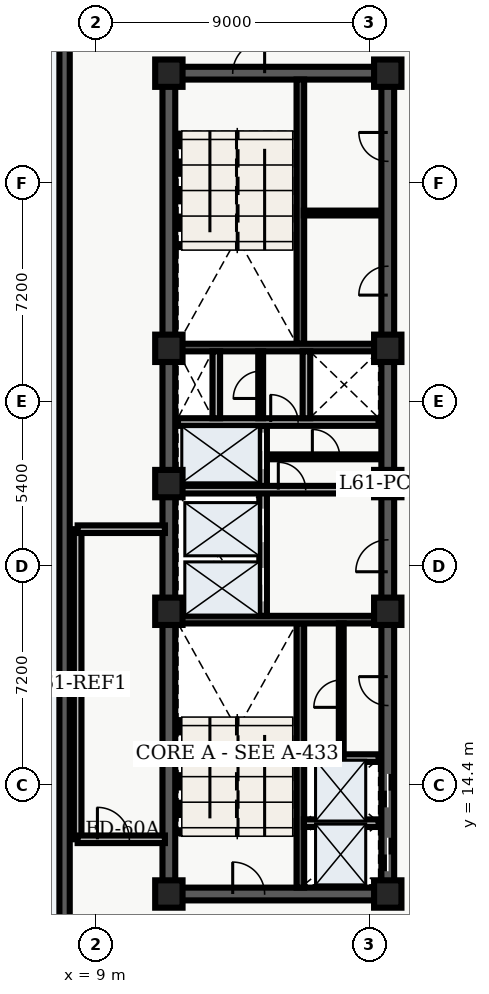
"""IFC4 building model, lengths in metres.
Left out: names, types, materials, properties, quantities, classifications, styles, units other than length and angle.
Written with IfcOpenShell. Run it as: python <this file> out.ifc"""

import sys

from ifc_helpers import new_model, entity, si_unit, converted_unit, direction, frame, origin_with_axes, origin_2d_with_axis, place, context, subcontext, project, spatial, polyline, rectangle, outline, extrude, element, fill, save


model = new_model("IFC4")
c1 = context("Model", 3, precision=1e-05, world=origin_with_axes(), true_north=direction((0.0, 1.0)))
c2 = subcontext(c1, "Body", "Model", "MODEL_VIEW")
j1 = project(units=[si_unit("LENGTHUNIT", "METRE"), converted_unit("PLANEANGLEUNIT", "DEGREE", entity("IfcPlaneAngleMeasure", 0.017), si_unit("PLANEANGLEUNIT", "RADIAN"), dimensions=[0, 0, 0, 0, 0, 0, 0])], contexts=[c1])
p1 = place(None, origin_with_axes())
s1 = spatial("IfcSite", under=j1, at=p1, CompositionType="ELEMENT")
p2 = place(p1, origin_with_axes())
s2 = spatial("IfcBuilding", under=s1, at=p2, CompositionType="ELEMENT")
p3 = place(p2, frame((0.0, 0.0, 248.1), z_axis=(0.0, 0.0, 1.0), x_axis=(1.0, 0.0, 0.0)))
s3 = spatial("IfcBuildingStorey", under=s2, at=p3, CompositionType="ELEMENT", Elevation=248.1)
p4 = place(p3, frame((11.4, 10.8, 0.0), z_axis=(0.0, 0.0, 1.0), x_axis=(0.0, 1.0, 0.0)))
e1 = element("IfcWall", 1, at=p4, inside=s3, PredefinedType="SHEAR", context=c2, shape_type="SweptSolid", body=[
    extrude(outline(polyline([(0.0, -0.21), (27.0, -0.21), (27.0, 0.21), (0.0, 0.21), (0.0, -0.21)])), origin_with_axes(), (0.0, 0.0, 1.0), 4.56),
])
p5 = place(p3, frame((11.4, 10.8, 0.0), z_axis=(0.0, 0.0, 1.0), x_axis=(1.0, 0.0, 0.0)))
e2 = element("IfcWall", 2, at=p5, inside=s3, PredefinedType="SHEAR", context=c2, shape_type="SweptSolid", body=[
    extrude(outline(polyline([(0.0, -0.21), (7.2, -0.21), (7.2, 0.21), (0.0, 0.21), (0.0, -0.21)])), origin_with_axes(), (0.0, 0.0, 1.0), 4.56),
])
p6 = place(p5, frame((2.625, 0.0, 0.0), z_axis=(0.0, 0.0, 1.0), x_axis=(1.0, 0.0, 0.0)))
e3 = element("IfcOpeningElement", 3, at=p6, cuts=e2, PredefinedType="OPENING", context=c2, shape_type="SweptSolid", body=[
    extrude(rectangle(XDim=1.05, YDim=0.44, at=origin_2d_with_axis()), origin_with_axes(), (0.0, 0.0, 1.0), 2.15),
])
p7 = place(p3, frame((11.4, 37.8, 0.0), z_axis=(0.0, 0.0, 1.0), x_axis=(1.0, 0.0, 0.0)))
e4 = element("IfcWall", 4, at=p7, inside=s3, PredefinedType="SHEAR", context=c2, shape_type="SweptSolid", body=[
    extrude(outline(polyline([(0.0, -0.21), (7.2, -0.21), (7.2, 0.21), (0.0, 0.21), (0.0, -0.21)])), origin_with_axes(), (0.0, 0.0, 1.0), 4.56),
])
p8 = place(p7, frame((2.625, 0.0, 0.0), z_axis=(0.0, 0.0, 1.0), x_axis=(1.0, 0.0, 0.0)))
e5 = element("IfcOpeningElement", 5, at=p8, cuts=e4, PredefinedType="OPENING", context=c2, shape_type="SweptSolid", body=[
    extrude(rectangle(XDim=1.05, YDim=0.44, at=origin_2d_with_axis()), origin_with_axes(), (0.0, 0.0, 1.0), 2.15),
])
p9 = place(p3, frame((18.6, 10.8, 0.0), z_axis=(0.0, 0.0, 1.0), x_axis=(0.0, 1.0, 0.0)))
e6 = element("IfcWall", 6, at=p9, inside=s3, PredefinedType="SHEAR", context=c2, shape_type="SweptSolid", body=[
    extrude(outline(polyline([(0.0, -0.21), (13.5, -0.21), (13.5, 0.21), (0.0, 0.21), (0.0, -0.21)])), origin_with_axes(), (0.0, 0.0, 1.0), 4.56),
])
p10 = place(p9, frame((1.3, 0.0, 0.0), z_axis=(0.0, 0.0, 1.0), x_axis=(1.0, 0.0, 0.0)))
e7 = element("IfcOpeningElement", 7, at=p10, cuts=e6, PredefinedType="OPENING", context=c2, shape_type="SweptSolid", body=[
    extrude(rectangle(XDim=1.1, YDim=0.44, at=origin_2d_with_axis()), origin_with_axes(), (0.0, 0.0, 1.0), 2.15),
])
p11 = place(p9, frame((3.4, 0.0, 0.0), z_axis=(0.0, 0.0, 1.0), x_axis=(1.0, 0.0, 0.0)))
e8 = element("IfcOpeningElement", 8, at=p11, cuts=e6, PredefinedType="OPENING", context=c2, shape_type="SweptSolid", body=[
    extrude(rectangle(XDim=1.1, YDim=0.44, at=origin_2d_with_axis()), origin_with_axes(), (0.0, 0.0, 1.0), 2.15),
])
p12 = place(p9, frame((11.125, 0.0, 0.0), z_axis=(0.0, 0.0, 1.0), x_axis=(1.0, 0.0, 0.0)))
e9 = element("IfcOpeningElement", 9, at=p12, cuts=e6, PredefinedType="OPENING", context=c2, shape_type="SweptSolid", body=[
    extrude(rectangle(XDim=1.05, YDim=0.44, at=origin_2d_with_axis()), origin_with_axes(), (0.0, 0.0, 1.0), 2.15),
])
p13 = place(p9, frame((6.675, 0.0, 0.0), z_axis=(0.0, 0.0, 1.0), x_axis=(1.0, 0.0, 0.0)))
e10 = element("IfcOpeningElement", 10, at=p13, cuts=e6, PredefinedType="OPENING", context=c2, shape_type="SweptSolid", body=[
    extrude(rectangle(XDim=0.95, YDim=0.44, at=origin_2d_with_axis()), origin_with_axes(), (0.0, 0.0, 1.0), 2.15),
])
p14 = place(p3, frame((18.6, 24.3, 0.0), z_axis=(0.0, 0.0, 1.0), x_axis=(0.0, 1.0, 0.0)))
e11 = element("IfcWall", 11, at=p14, inside=s3, PredefinedType="SHEAR", context=c2, shape_type="SweptSolid", body=[
    extrude(outline(polyline([(0.0, -0.21), (13.5, -0.21), (13.5, 0.21), (0.0, 0.21), (0.0, -0.21)])), origin_with_axes(), (0.0, 0.0, 1.0), 4.56),
])
p15 = place(p14, frame((6.675, 0.0, 0.0), z_axis=(0.0, 0.0, 1.0), x_axis=(1.0, 0.0, 0.0)))
e12 = element("IfcOpeningElement", 12, at=p15, cuts=e11, PredefinedType="OPENING", context=c2, shape_type="SweptSolid", body=[
    extrude(rectangle(XDim=0.95, YDim=0.44, at=origin_2d_with_axis()), origin_with_axes(), (0.0, 0.0, 1.0), 2.15),
])
p16 = place(p14, frame((11.075, 0.0, 0.0), z_axis=(0.0, 0.0, 1.0), x_axis=(1.0, 0.0, 0.0)))
e13 = element("IfcOpeningElement", 13, at=p16, cuts=e11, PredefinedType="OPENING", context=c2, shape_type="SweptSolid", body=[
    extrude(rectangle(XDim=0.95, YDim=0.44, at=origin_2d_with_axis()), origin_with_axes(), (0.0, 0.0, 1.0), 2.15),
])
p17 = place(p3, frame((15.725, 11.01, 0.0), z_axis=(0.0, 0.0, 1.0), x_axis=(0.0, 1.0, 0.0)))
e14 = element("IfcWall", 14, at=p17, inside=s3, PredefinedType="SHEAR", context=c2, shape_type="SweptSolid", body=[
    extrude(outline(polyline([(0.0, -0.125), (8.69, -0.125), (8.69, 0.125), (0.0, 0.125), (0.0, -0.125)])), origin_with_axes(), (0.0, 0.0, 1.0), 4.56),
])
p18 = place(p3, frame((11.61, 19.825, 0.0), z_axis=(0.0, 0.0, 1.0), x_axis=(1.0, 0.0, 0.0)))
e15 = element("IfcWall", 15, at=p18, inside=s3, PredefinedType="SHEAR", context=c2, shape_type="SweptSolid", body=[
    extrude(outline(polyline([(0.0, -0.125), (6.78, -0.125), (6.78, 0.125), (0.0, 0.125), (0.0, -0.125)])), origin_with_axes(), (0.0, 0.0, 1.0), 4.56),
])
p19 = place(p3, frame((15.725, 28.9, 0.0), z_axis=(0.0, 0.0, 1.0), x_axis=(0.0, 1.0, 0.0)))
e16 = element("IfcWall", 16, at=p19, inside=s3, PredefinedType="SHEAR", context=c2, shape_type="SweptSolid", body=[
    extrude(outline(polyline([(0.0, -0.125), (8.69, -0.125), (8.69, 0.125), (0.0, 0.125), (0.0, -0.125)])), origin_with_axes(), (0.0, 0.0, 1.0), 4.56),
])
p20 = place(p3, frame((11.61, 28.775, 0.0), z_axis=(0.0, 0.0, 1.0), x_axis=(1.0, 0.0, 0.0)))
e17 = element("IfcWall", 17, at=p20, inside=s3, PredefinedType="SHEAR", context=c2, shape_type="SweptSolid", body=[
    extrude(outline(polyline([(0.0, -0.125), (6.78, -0.125), (6.78, 0.125), (0.0, 0.125), (0.0, -0.125)])), origin_with_axes(), (0.0, 0.0, 1.0), 4.56),
])
p21 = place(p3, frame((14.5, 19.95, 0.0), z_axis=(0.0, 0.0, 1.0), x_axis=(0.0, 1.0, 0.0)))
e18 = element("IfcWall", 18, at=p21, inside=s3, PredefinedType="SOLIDWALL", context=c2, shape_type="SweptSolid", body=[
    extrude(outline(polyline([(0.0, -0.125), (6.25, -0.125), (6.25, 0.125), (0.0, 0.125), (0.0, -0.125)])), origin_with_axes(), (0.0, 0.0, 1.0), 3.6),
])
p22 = place(p21, frame((1.025, 0.0, 0.0), z_axis=(0.0, 0.0, 1.0), x_axis=(1.0, 0.0, 0.0)))
e19 = element("IfcOpeningElement", 19, at=p22, cuts=e18, PredefinedType="OPENING", context=c2, shape_type="SweptSolid", body=[
    extrude(rectangle(XDim=1.1, YDim=0.27, at=origin_2d_with_axis()), origin_with_axes(), (0.0, 0.0, 1.0), 2.15),
])
p23 = place(p21, frame((2.975, 0.0, 0.0), z_axis=(0.0, 0.0, 1.0), x_axis=(1.0, 0.0, 0.0)))
e20 = element("IfcOpeningElement", 20, at=p23, cuts=e18, PredefinedType="OPENING", context=c2, shape_type="SweptSolid", body=[
    extrude(rectangle(XDim=1.1, YDim=0.27, at=origin_2d_with_axis()), origin_with_axes(), (0.0, 0.0, 1.0), 2.15),
])
p24 = place(p21, frame((5.425, 0.0, 0.0), z_axis=(0.0, 0.0, 1.0), x_axis=(1.0, 0.0, 0.0)))
e21 = element("IfcOpeningElement", 21, at=p24, cuts=e18, PredefinedType="OPENING", context=c2, shape_type="SweptSolid", body=[
    extrude(rectangle(XDim=1.2, YDim=0.27, at=origin_2d_with_axis()), origin_with_axes(), (0.0, 0.0, 1.0), 2.15),
])
p25 = place(p3, frame((11.7, 24.1, 0.0), z_axis=(0.0, 0.0, 1.0), x_axis=(1.0, 0.0, 0.0)))
e22 = element("IfcWall", 22, at=p25, inside=s3, PredefinedType="SOLIDWALL", context=c2, shape_type="SweptSolid", body=[
    extrude(outline(polyline([(0.0, -0.125), (6.6, -0.125), (6.6, 0.125), (0.0, 0.125), (0.0, -0.125)])), origin_with_axes(), (0.0, 0.0, 1.0), 3.6),
])
p26 = place(p25, frame((3.75, 0.0, 0.0), z_axis=(0.0, 0.0, 1.0), x_axis=(1.0, 0.0, 0.0)))
e23 = element("IfcOpeningElement", 23, at=p26, cuts=e22, PredefinedType="OPENING", context=c2, shape_type="SweptSolid", body=[
    extrude(rectangle(XDim=0.9, YDim=0.27, at=origin_2d_with_axis()), origin_with_axes(), (0.0, 0.0, 1.0), 2.15),
])
p27 = place(p3, frame((11.7, 26.325, 0.0), z_axis=(0.0, 0.0, 1.0), x_axis=(1.0, 0.0, 0.0)))
e24 = element("IfcWall", 24, at=p27, inside=s3, PredefinedType="SOLIDWALL", context=c2, shape_type="SweptSolid", body=[
    extrude(outline(polyline([(0.0, -0.125), (6.6, -0.125), (6.6, 0.125), (0.0, 0.125), (0.0, -0.125)])), origin_with_axes(), (0.0, 0.0, 1.0), 3.6),
])
p28 = place(p27, frame((3.5, 0.0, 0.0), z_axis=(0.0, 0.0, 1.0), x_axis=(1.0, 0.0, 0.0)))
e25 = element("IfcOpeningElement", 25, at=p28, cuts=e24, PredefinedType="OPENING", context=c2, shape_type="SweptSolid", body=[
    extrude(rectangle(XDim=0.9, YDim=0.27, at=origin_2d_with_axis()), origin_with_axes(), (0.0, 0.0, 1.0), 2.15),
])
for number, where, z_axis, x_axis in (
    (26, (12.96, 26.45, 0.0), (0.0, 0.0, 1.0), (0.0, 1.0, 0.0)),
    (27, (15.925, 26.45, 0.0), (0.0, 0.0, 1.0), (0.0, 1.0, 0.0)),
):
    element("IfcWall", number, at=place(p3, frame(where, z_axis=z_axis, x_axis=x_axis)), inside=s3, PredefinedType="SOLIDWALL", context=c2, shape_type="SweptSolid", body=[
        extrude(outline(polyline([(0.0, -0.125), (2.2, -0.125), (2.2, 0.125), (0.0, 0.125), (0.0, -0.125)])), origin_with_axes(), (0.0, 0.0, 1.0), 3.6),
    ])
for number, where, z_axis, x_axis in (
    (28, (11.4, 10.8, 0.0), (0.0, 0.0, 1.0), (1.0, 0.0, 0.0)),
    (29, (11.4, 20.1, 0.0), (0.0, 0.0, 1.0), (1.0, 0.0, 0.0)),
    (30, (11.4, 24.3, 0.0), (0.0, 0.0, 1.0), (1.0, 0.0, 0.0)),
    (31, (11.4, 28.75, 0.0), (0.0, 0.0, 1.0), (1.0, 0.0, 0.0)),
    (32, (11.4, 37.8, 0.0), (0.0, 0.0, 1.0), (1.0, 0.0, 0.0)),
    (33, (18.6, 10.8, 0.0), (0.0, 0.0, 1.0), (1.0, 0.0, 0.0)),
    (34, (18.6, 20.1, 0.0), (0.0, 0.0, 1.0), (1.0, 0.0, 0.0)),
    (35, (18.6, 24.3, 0.0), (0.0, 0.0, 1.0), (1.0, 0.0, 0.0)),
    (36, (18.6, 28.75, 0.0), (0.0, 0.0, 1.0), (1.0, 0.0, 0.0)),
    (37, (18.6, 37.8, 0.0), (0.0, 0.0, 1.0), (1.0, 0.0, 0.0)),
):
    element("IfcColumn", number, at=place(p3, frame(where, z_axis=z_axis, x_axis=x_axis)), inside=s3, PredefinedType="COLUMN", context=c2, shape_type="SweptSolid", body=[
        extrude(rectangle(XDim=0.9, YDim=0.9, at=origin_2d_with_axis()), origin_with_axes(), (0.0, 0.0, 1.0), 4.8),
    ])
p29 = place(p3, frame((14.62, 25.18, 0.0), z_axis=(0.0, 0.0, 1.0), x_axis=(1.0, 0.0, 0.0)))
e38 = element("IfcWall", 38, at=p29, inside=s3, PredefinedType="PARTITIONING", context=c2, shape_type="SweptSolid", body=[
    extrude(outline(polyline([(0.0, -0.08), (3.68, -0.08), (3.68, 0.08), (0.0, 0.08), (0.0, -0.08)])), origin_with_axes(), (0.0, 0.0, 1.0), 3.2),
])
p30 = place(p29, frame((1.95, 0.0, 0.0), z_axis=(0.0, 0.0, 1.0), x_axis=(1.0, 0.0, 0.0)))
e39 = element("IfcOpeningElement", 39, at=p30, cuts=e38, PredefinedType="OPENING", context=c2, shape_type="SweptSolid", body=[
    extrude(rectangle(XDim=0.9, YDim=0.18, at=origin_2d_with_axis()), origin_with_axes(), (0.0, 0.0, 1.0), 2.15),
])
p31 = place(p3, frame((14.42, 26.45, 0.0), z_axis=(0.0, 0.0, 1.0), x_axis=(0.0, 1.0, 0.0)))
e40 = element("IfcWall", 40, at=p31, inside=s3, PredefinedType="PARTITIONING", context=c2, shape_type="SweptSolid", body=[
    extrude(outline(polyline([(0.0, -0.08), (2.2, -0.08), (2.2, 0.08), (0.0, 0.08), (0.0, -0.08)])), origin_with_axes(), (0.0, 0.0, 1.0), 3.2),
])
p32 = place(p31, frame((1.1, 0.0, 0.0), z_axis=(0.0, 0.0, 1.0), x_axis=(1.0, 0.0, 0.0)))
e41 = element("IfcOpeningElement", 41, at=p32, cuts=e40, PredefinedType="OPENING", context=c2, shape_type="SweptSolid", body=[
    extrude(rectangle(XDim=0.9, YDim=0.18, at=origin_2d_with_axis()), origin_with_axes(), (0.0, 0.0, 1.0), 2.15),
])
for number, where, z_axis, x_axis in (
    (42, (15.84, 13.13, 0.0), (0.0, 0.0, 1.0), (1.0, 0.0, 0.0)),
    (43, (15.84, 15.27, 0.0), (0.0, 0.0, 1.0), (1.0, 0.0, 0.0)),
):
    element("IfcWall", number, at=place(p3, frame(where, z_axis=z_axis, x_axis=x_axis)), inside=s3, PredefinedType="SOLIDWALL", context=c2, shape_type="SweptSolid", body=[
        extrude(outline(polyline([(0.0, -0.125), (2.46, -0.125), (2.46, 0.125), (0.0, 0.125), (0.0, -0.125)])), origin_with_axes(), (0.0, 0.0, 1.0), 3.2),
    ])
p33 = place(p3, frame((17.07, 15.34, 0.0), z_axis=(0.0, 0.0, 1.0), x_axis=(0.0, 1.0, 0.0)))
e44 = element("IfcWall", 44, at=p33, inside=s3, PredefinedType="PARTITIONING", context=c2, shape_type="SweptSolid", body=[
    extrude(outline(polyline([(0.0, -0.08), (4.36, -0.08), (4.36, 0.08), (0.0, 0.08), (0.0, -0.08)])), origin_with_axes(), (0.0, 0.0, 1.0), 3.2),
])
p34 = place(p33, frame((2.05, 0.0, 0.0), z_axis=(0.0, 0.0, 1.0), x_axis=(1.0, 0.0, 0.0)))
e45 = element("IfcOpeningElement", 45, at=p34, cuts=e44, PredefinedType="OPENING", context=c2, shape_type="SweptSolid", body=[
    extrude(rectangle(XDim=0.9, YDim=0.18, at=origin_2d_with_axis()), origin_with_axes(), (0.0, 0.0, 1.0), 2.15),
])
p35 = place(p3, frame((15.84, 33.2, 0.0), z_axis=(0.0, 0.0, 1.0), x_axis=(1.0, 0.0, 0.0)))
e46 = element("IfcWall", 46, at=p35, inside=s3, PredefinedType="PARTITIONING", context=c2, shape_type="SweptSolid", body=[
    extrude(outline(polyline([(0.0, -0.08), (2.46, -0.08), (2.46, 0.08), (0.0, 0.08), (0.0, -0.08)])), origin_with_axes(), (0.0, 0.0, 1.0), 3.2),
])
p36 = place(p3, frame((8.4, 12.6, 0.0), z_axis=(0.0, 0.0, 1.0), x_axis=(0.0, 1.0, 0.0)))
e47 = element("IfcWall", 47, at=p36, inside=s3, PredefinedType="SOLIDWALL", context=c2, shape_type="SweptSolid", body=[
    extrude(outline(polyline([(0.0, -0.125), (10.2, -0.125), (10.2, 0.125), (0.0, 0.125), (0.0, -0.125)])), origin_with_axes(), (0.0, 0.0, 1.0), 3.2),
])
p37 = place(p3, frame((8.4, 12.6, 0.0), z_axis=(0.0, 0.0, 1.0), x_axis=(1.0, 0.0, 0.0)))
e48 = element("IfcWall", 48, at=p37, inside=s3, PredefinedType="SOLIDWALL", context=c2, shape_type="SweptSolid", body=[
    extrude(outline(polyline([(0.0, -0.125), (2.87, -0.125), (2.87, 0.125), (0.0, 0.125), (0.0, -0.125)])), origin_with_axes(), (0.0, 0.0, 1.0), 3.2),
])
p38 = place(p37, frame((1.175, 0.0, 0.0), z_axis=(0.0, 0.0, 1.0), x_axis=(1.0, 0.0, 0.0)))
e49 = element("IfcOpeningElement", 49, at=p38, cuts=e48, PredefinedType="OPENING", context=c2, shape_type="SweptSolid", body=[
    extrude(rectangle(XDim=1.05, YDim=0.27, at=origin_2d_with_axis()), origin_with_axes(), (0.0, 0.0, 1.0), 2.15),
])
p39 = place(p3, frame((8.4, 22.8, 0.0), z_axis=(0.0, 0.0, 1.0), x_axis=(1.0, 0.0, 0.0)))
e50 = element("IfcWall", 50, at=p39, inside=s3, PredefinedType="SOLIDWALL", context=c2, shape_type="SweptSolid", body=[
    extrude(outline(polyline([(0.0, -0.125), (2.87, -0.125), (2.87, 0.125), (0.0, 0.125), (0.0, -0.125)])), origin_with_axes(), (0.0, 0.0, 1.0), 3.2),
])
p40 = place(p3, frame((7.97, 2.74, 0.0), z_axis=(0.0, 0.0, 1.0), x_axis=(0.0, 1.0, 0.0)))
e51 = element("IfcWall", 51, at=p40, inside=s3, PredefinedType="SOLIDWALL", context=c2, shape_type="SweptSolid", body=[
    extrude(outline(polyline([(0.0, -0.17), (43.46, -0.17), (43.46, 0.17), (0.0, 0.17), (0.0, -0.17)])), origin_with_axes(), (0.0, 0.0, 1.0), 4.56),
])
p41 = place(p9, frame((1.3, 0.0, 0.0), z_axis=(0.0, 0.0, 1.0), x_axis=(1.0, 0.0, 0.0)))
e52 = element("IfcDoor", 52, at=p41, inside=s3, OperationType="SLIDING_TO_LEFT", PredefinedType="DOOR", context=c2, shape_type="SweptSolid", body=[
    extrude(rectangle(XDim=1.1, YDim=0.09, at=origin_2d_with_axis()), origin_with_axes(), (0.0, 0.0, 1.0), 2.15),
])
fill(e7, e52)
p42 = place(p9, frame((3.4, 0.0, 0.0), z_axis=(0.0, 0.0, 1.0), x_axis=(1.0, 0.0, 0.0)))
e53 = element("IfcDoor", 53, at=p42, inside=s3, OperationType="SLIDING_TO_RIGHT", PredefinedType="DOOR", context=c2, shape_type="SweptSolid", body=[
    extrude(rectangle(XDim=1.1, YDim=0.09, at=origin_2d_with_axis()), origin_with_axes(), (0.0, 0.0, 1.0), 2.15),
])
fill(e8, e53)
p43 = place(p21, frame((1.025, 0.0, 0.0), z_axis=(0.0, 0.0, 1.0), x_axis=(1.0, 0.0, 0.0)))
e54 = element("IfcDoor", 54, at=p43, inside=s3, OperationType="SLIDING_TO_LEFT", PredefinedType="DOOR", context=c2, shape_type="SweptSolid", body=[
    extrude(rectangle(XDim=1.1, YDim=0.09, at=origin_2d_with_axis()), origin_with_axes(), (0.0, 0.0, 1.0), 2.15),
])
fill(e19, e54)
p44 = place(p21, frame((2.975, 0.0, 0.0), z_axis=(0.0, 0.0, 1.0), x_axis=(1.0, 0.0, 0.0)))
e55 = element("IfcDoor", 55, at=p44, inside=s3, OperationType="SLIDING_TO_RIGHT", PredefinedType="DOOR", context=c2, shape_type="SweptSolid", body=[
    extrude(rectangle(XDim=1.1, YDim=0.09, at=origin_2d_with_axis()), origin_with_axes(), (0.0, 0.0, 1.0), 2.15),
])
fill(e20, e55)
p45 = place(p21, frame((5.425, 0.0, 0.0), z_axis=(0.0, 0.0, 1.0), x_axis=(1.0, 0.0, 0.0)))
e56 = element("IfcDoor", 56, at=p45, inside=s3, OperationType="DOUBLE_DOOR_SLIDING", PredefinedType="DOOR", context=c2, shape_type="SweptSolid", body=[
    extrude(rectangle(XDim=1.2, YDim=0.09, at=origin_2d_with_axis()), origin_with_axes(), (0.0, 0.0, 1.0), 2.15),
])
fill(e21, e56)
p46 = place(p5, frame((2.625, 0.0, 0.0), z_axis=(0.0, 0.0, 1.0), x_axis=(1.0, 0.0, 0.0)))
e57 = element("IfcDoor", 57, at=p46, inside=s3, OperationType="SINGLE_SWING_LEFT", PredefinedType="DOOR", context=c2, shape_type="SweptSolid", body=[
    extrude(rectangle(XDim=1.05, YDim=0.09, at=origin_2d_with_axis()), origin_with_axes(), (0.0, 0.0, 1.0), 2.15),
])
fill(e3, e57)
p47 = place(p7, frame((2.625, 0.0, 0.0), z_axis=(0.0, 0.0, 1.0), x_axis=(1.0, 0.0, 0.0)))
e58 = element("IfcDoor", 58, at=p47, inside=s3, OperationType="SINGLE_SWING_RIGHT", PredefinedType="DOOR", context=c2, shape_type="SweptSolid", body=[
    extrude(rectangle(XDim=1.05, YDim=0.09, at=origin_2d_with_axis()), origin_with_axes(), (0.0, 0.0, 1.0), 2.15),
])
fill(e5, e58)
p48 = place(p9, frame((11.125, 0.0, 0.0), z_axis=(0.0, 0.0, 1.0), x_axis=(1.0, 0.0, 0.0)))
e59 = element("IfcDoor", 59, at=p48, inside=s3, OperationType="SINGLE_SWING_LEFT", PredefinedType="DOOR", context=c2, shape_type="SweptSolid", body=[
    extrude(rectangle(XDim=1.05, YDim=0.09, at=origin_2d_with_axis()), origin_with_axes(), (0.0, 0.0, 1.0), 2.15),
])
fill(e9, e59)
p49 = place(p27, frame((3.5, 0.0, 0.0), z_axis=(0.0, 0.0, 1.0), x_axis=(1.0, 0.0, 0.0)))
e60 = element("IfcDoor", 60, at=p49, inside=s3, OperationType="SINGLE_SWING_LEFT", PredefinedType="DOOR", context=c2, shape_type="SweptSolid", body=[
    extrude(rectangle(XDim=0.9, YDim=0.09, at=origin_2d_with_axis()), origin_with_axes(), (0.0, 0.0, 1.0), 2.15),
])
fill(e25, e60)
p50 = place(p31, frame((1.1, 0.0, 0.0), z_axis=(0.0, 0.0, 1.0), x_axis=(1.0, 0.0, 0.0)))
e61 = element("IfcDoor", 61, at=p50, inside=s3, OperationType="SINGLE_SWING_LEFT", PredefinedType="DOOR", context=c2, shape_type="SweptSolid", body=[
    extrude(rectangle(XDim=0.9, YDim=0.09, at=origin_2d_with_axis()), origin_with_axes(), (0.0, 0.0, 1.0), 2.15),
])
fill(e41, e61)
p51 = place(p25, frame((3.75, 0.0, 0.0), z_axis=(0.0, 0.0, 1.0), x_axis=(1.0, 0.0, 0.0)))
e62 = element("IfcDoor", 62, at=p51, inside=s3, OperationType="SINGLE_SWING_LEFT", PredefinedType="DOOR", context=c2, shape_type="SweptSolid", body=[
    extrude(rectangle(XDim=0.9, YDim=0.09, at=origin_2d_with_axis()), origin_with_axes(), (0.0, 0.0, 1.0), 2.15),
])
fill(e23, e62)
p52 = place(p29, frame((1.95, 0.0, 0.0), z_axis=(0.0, 0.0, 1.0), x_axis=(1.0, 0.0, 0.0)))
e63 = element("IfcDoor", 63, at=p52, inside=s3, OperationType="SINGLE_SWING_LEFT", PredefinedType="DOOR", context=c2, shape_type="SweptSolid", body=[
    extrude(rectangle(XDim=0.9, YDim=0.09, at=origin_2d_with_axis()), origin_with_axes(), (0.0, 0.0, 1.0), 2.15),
])
fill(e39, e63)
p53 = place(p33, frame((2.05, 0.0, 0.0), z_axis=(0.0, 0.0, 1.0), x_axis=(1.0, 0.0, 0.0)))
e64 = element("IfcDoor", 64, at=p53, inside=s3, OperationType="SINGLE_SWING_LEFT", PredefinedType="DOOR", context=c2, shape_type="SweptSolid", body=[
    extrude(rectangle(XDim=0.9, YDim=0.09, at=origin_2d_with_axis()), origin_with_axes(), (0.0, 0.0, 1.0), 2.15),
])
fill(e45, e64)
p54 = place(p9, frame((6.675, 0.0, 0.0), z_axis=(0.0, 0.0, 1.0), x_axis=(1.0, 0.0, 0.0)))
e65 = element("IfcDoor", 65, at=p54, inside=s3, OperationType="SINGLE_SWING_RIGHT", PredefinedType="DOOR", context=c2, shape_type="SweptSolid", body=[
    extrude(rectangle(XDim=0.95, YDim=0.09, at=origin_2d_with_axis()), origin_with_axes(), (0.0, 0.0, 1.0), 2.15),
])
fill(e10, e65)
p55 = place(p14, frame((6.675, 0.0, 0.0), z_axis=(0.0, 0.0, 1.0), x_axis=(1.0, 0.0, 0.0)))
e66 = element("IfcDoor", 66, at=p55, inside=s3, OperationType="SINGLE_SWING_LEFT", PredefinedType="DOOR", context=c2, shape_type="SweptSolid", body=[
    extrude(rectangle(XDim=0.95, YDim=0.09, at=origin_2d_with_axis()), origin_with_axes(), (0.0, 0.0, 1.0), 2.15),
])
fill(e12, e66)
p56 = place(p14, frame((11.075, 0.0, 0.0), z_axis=(0.0, 0.0, 1.0), x_axis=(1.0, 0.0, 0.0)))
e67 = element("IfcDoor", 67, at=p56, inside=s3, OperationType="SINGLE_SWING_RIGHT", PredefinedType="DOOR", context=c2, shape_type="SweptSolid", body=[
    extrude(rectangle(XDim=0.95, YDim=0.09, at=origin_2d_with_axis()), origin_with_axes(), (0.0, 0.0, 1.0), 2.15),
])
fill(e13, e67)
p57 = place(p37, frame((1.175, 0.0, 0.0), z_axis=(0.0, 0.0, 1.0), x_axis=(1.0, 0.0, 0.0)))
e68 = element("IfcDoor", 68, at=p57, inside=s3, OperationType="SINGLE_SWING_LEFT", PredefinedType="DOOR", context=c2, shape_type="SweptSolid", body=[
    extrude(rectangle(XDim=1.05, YDim=0.09, at=origin_2d_with_axis()), origin_with_axes(), (0.0, 0.0, 1.0), 2.15),
])
fill(e49, e68)
save(model, sys.argv[1])
